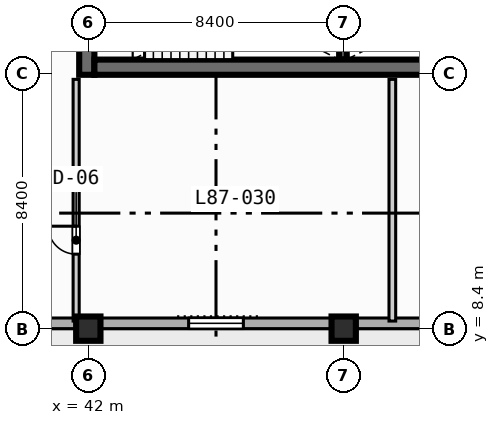
"""IFC4 building model, lengths in metres.
Left out: names, types, materials, properties, quantities, classifications, styles, units other than length and angle.
Written with IfcOpenShell. Run it as: python <this file> out.ifc"""

import sys

from ifc_helpers import new_model, si_unit, direction, frame, frame_2d, origin, origin_2d, place, context, subcontext, project, spatial, rectangle, extrude, element, fill, save


model = new_model("IFC4")
c1 = context("Model", 3, precision=1e-05, world=origin(), true_north=direction((0.0, 1.0)))
c2 = subcontext(c1, "Body", "Model", "MODEL_VIEW")
j1 = project(units=[si_unit("LENGTHUNIT", "METRE"), si_unit("PLANEANGLEUNIT", "RADIAN")], contexts=[c1])
p1 = place(None, origin())
s1 = spatial("IfcSite", under=j1, at=p1, CompositionType="ELEMENT")
p2 = place(p1, origin())
s2 = spatial("IfcBuilding", under=s1, at=p2, CompositionType="ELEMENT")
p3 = place(p2, frame((0.0, 0.0, 351.5)))
s3 = spatial("IfcBuildingStorey", under=s2, at=p3, CompositionType="ELEMENT", Elevation=351.5)
p4 = place(p3, frame((50.375, 17.25, 0.0), z_axis=(0.0, 0.0, 1.0), x_axis=(0.0, 1.0, 0.0)))
e1 = element("IfcWall", 1, at=p4, inside=s3, PredefinedType="SOLIDWALL", context=c2, shape_type="SweptSolid", body=[
    extrude(rectangle(XDim=3.5, YDim=0.25, at=frame_2d((1.75, 0.0))), origin(), (0.0, 0.0, 1.0), 3.67),
])
p5 = place(p3, frame((41.95, 16.75, 0.0), z_axis=(0.0, 0.0, 1.0), x_axis=(0.0, 1.0, 0.0)))
e2 = element("IfcWall", 2, at=p5, inside=s3, PredefinedType="SHEAR", context=c2, shape_type="SweptSolid", body=[
    extrude(rectangle(XDim=1.25, YDim=0.5, at=frame_2d((0.625, 0.0))), origin(), (0.0, 0.0, 1.0), 3.67),
])
p6 = place(p3, frame((42.2, 17.0, 0.0), z_axis=(0.0, 0.0, 1.0), x_axis=(1.0, 0.0, 0.0)))
e3 = element("IfcWall", 3, at=p6, inside=s3, PredefinedType="SHEAR", context=c2, shape_type="SweptSolid", body=[
    extrude(rectangle(XDim=16.35, YDim=0.5, at=frame_2d((8.175, 0.0))), origin(), (0.0, 0.0, 1.0), 3.67),
])
for number, where, z_axis, x_axis in (
    (4, (42.0, 8.4, 0.0), (0.0, 0.0, 1.0), (1.0, 0.0, 0.0)),
    (5, (50.4, 8.4, 0.0), (0.0, 0.0, 1.0), (1.0, 0.0, 0.0)),
):
    element("IfcColumn", number, at=place(p3, frame(where, z_axis=z_axis, x_axis=x_axis)), inside=s3, PredefinedType="COLUMN", context=c2, shape_type="SweptSolid", body=[
        extrude(rectangle(XDim=0.8, YDim=0.8, at=origin_2d()), origin(), (0.0, 0.0, 1.0), 3.9),
    ])
p7 = place(p3, frame((64.025, 8.575, 0.0), z_axis=(0.0, 0.0, 1.0), x_axis=(-1.0, 0.0, 0.0)))
e6 = element("IfcWall", 6, at=p7, inside=s3, PredefinedType="STANDARD", context=c2, shape_type="SweptSolid", body=[
    extrude(rectangle(XDim=52.45, YDim=0.35, at=frame_2d((26.225, 0.0))), origin(), (0.0, 0.0, 1.0), 3.67),
])
p8 = place(p7, frame((33.425, 0.0, 0.0)))
e7 = element("IfcOpeningElement", 7, at=p8, cuts=e6, PredefinedType="OPENING", context=c2, shape_type="SweptSolid", body=[
    extrude(rectangle(XDim=1.4, YDim=2.2, at=frame_2d((0.7, 1.1))), frame((0.0, 0.185, 0.0), z_axis=(0.0, -1.0, 0.0), x_axis=(1.0, 0.0, 0.0)), (0.0, 0.0, 1.0), 0.37),
])
p9 = place(p7, frame((41.825, 0.0, 0.85)))
e8 = element("IfcOpeningElement", 8, at=p9, cuts=e6, PredefinedType="OPENING", context=c2, shape_type="SweptSolid", body=[
    extrude(rectangle(XDim=2.4, YDim=1.95, at=frame_2d((1.2, 0.975))), frame((0.0, 0.185, 0.0), z_axis=(0.0, -1.0, 0.0), x_axis=(1.0, 0.0, 0.0)), (0.0, 0.0, 1.0), 0.37),
])
p10 = place(p7, frame((25.025, 0.0, 0.85)))
e9 = element("IfcOpeningElement", 9, at=p10, cuts=e6, PredefinedType="OPENING", context=c2, shape_type="SweptSolid", body=[
    extrude(rectangle(XDim=2.4, YDim=1.95, at=frame_2d((1.2, 0.975))), frame((0.0, 0.185, 0.0), z_axis=(0.0, -1.0, 0.0), x_axis=(1.0, 0.0, 0.0)), (0.0, 0.0, 1.0), 0.37),
])
p11 = place(p7, frame((16.925, 0.0, 0.85)))
e10 = element("IfcOpeningElement", 10, at=p11, cuts=e6, PredefinedType="OPENING", context=c2, shape_type="SweptSolid", body=[
    extrude(rectangle(XDim=1.8, YDim=1.8, at=frame_2d((0.9, 0.9))), frame((0.0, 0.185, 0.0), z_axis=(0.0, -1.0, 0.0), x_axis=(1.0, 0.0, 0.0)), (0.0, 0.0, 1.0), 0.37),
])
p12 = place(p7, frame((48.575, 0.0, 0.85)))
e11 = element("IfcOpeningElement", 11, at=p12, cuts=e6, PredefinedType="OPENING", context=c2, shape_type="SweptSolid", body=[
    extrude(rectangle(XDim=1.8, YDim=1.8, at=frame_2d((0.9, 0.9))), frame((0.0, 0.185, 0.0), z_axis=(0.0, -1.0, 0.0), x_axis=(1.0, 0.0, 0.0)), (0.0, 0.0, 1.0), 0.37),
])
p13 = place(p7, frame((36.325, 0.0, 0.85)))
e12 = element("IfcOpeningElement", 12, at=p13, cuts=e6, PredefinedType="OPENING", context=c2, shape_type="SweptSolid", body=[
    extrude(rectangle(XDim=1.8, YDim=1.8, at=frame_2d((0.9, 0.9))), frame((0.0, 0.185, 0.0), z_axis=(0.0, -1.0, 0.0), x_axis=(1.0, 0.0, 0.0)), (0.0, 0.0, 1.0), 0.37),
])
p14 = place(p3, frame((41.6, 8.65, 0.0), z_axis=(0.0, 0.0, 1.0), x_axis=(0.0, 1.0, 0.0)))
e13 = element("IfcWall", 13, at=p14, inside=s3, PredefinedType="PARTITIONING", context=c2, shape_type="SweptSolid", body=[
    extrude(rectangle(XDim=7.95, YDim=0.2, at=frame_2d((3.975, 0.0))), origin(), (0.0, 0.0, 1.0), 3.67),
])
p15 = place(p14, frame((2.2, 0.0, 0.0)))
e14 = element("IfcOpeningElement", 14, at=p15, cuts=e13, PredefinedType="OPENING", context=c2, shape_type="SweptSolid", body=[
    extrude(rectangle(XDim=0.92, YDim=2.1, at=frame_2d((0.46, 1.05))), frame((0.0, 0.11, 0.0), z_axis=(0.0, -1.0, 0.0), x_axis=(1.0, 0.0, 0.0)), (0.0, 0.0, 1.0), 0.22),
])
p16 = place(p3, frame((52.0, 8.65, 0.0), z_axis=(0.0, 0.0, 1.0), x_axis=(0.0, 1.0, 0.0)))
e15 = element("IfcWall", 15, at=p16, inside=s3, PredefinedType="PARTITIONING", context=c2, shape_type="SweptSolid", body=[
    extrude(rectangle(XDim=7.95, YDim=0.22, at=frame_2d((3.975, 0.0))), origin(), (0.0, 0.0, 1.0), 3.67),
])
p17 = place(p11, origin())
e16 = element("IfcWindow", 16, at=p17, inside=s3, PartitioningType="SINGLE_PANEL", PredefinedType="WINDOW", context=c2, shape_type="SweptSolid", body=[
    extrude(rectangle(XDim=1.8, YDim=1.8, at=frame_2d((0.9, 0.9))), frame((0.0, 0.03, 0.0), z_axis=(0.0, -1.0, 0.0), x_axis=(1.0, 0.0, 0.0)), (0.0, 0.0, 1.0), 0.06),
])
fill(e10, e16)
p18 = place(p15, origin())
e17 = element("IfcDoor", 17, at=p18, inside=s3, OperationType="SINGLE_SWING_RIGHT", PredefinedType="DOOR", context=c2, shape_type="SweptSolid", body=[
    extrude(rectangle(XDim=0.92, YDim=2.1, at=frame_2d((0.46, 1.05))), frame((0.0, 0.025, 0.0), z_axis=(0.0, -1.0, 0.0), x_axis=(1.0, 0.0, 0.0)), (0.0, 0.0, 1.0), 0.05),
])
fill(e14, e17)
save(model, sys.argv[1])
